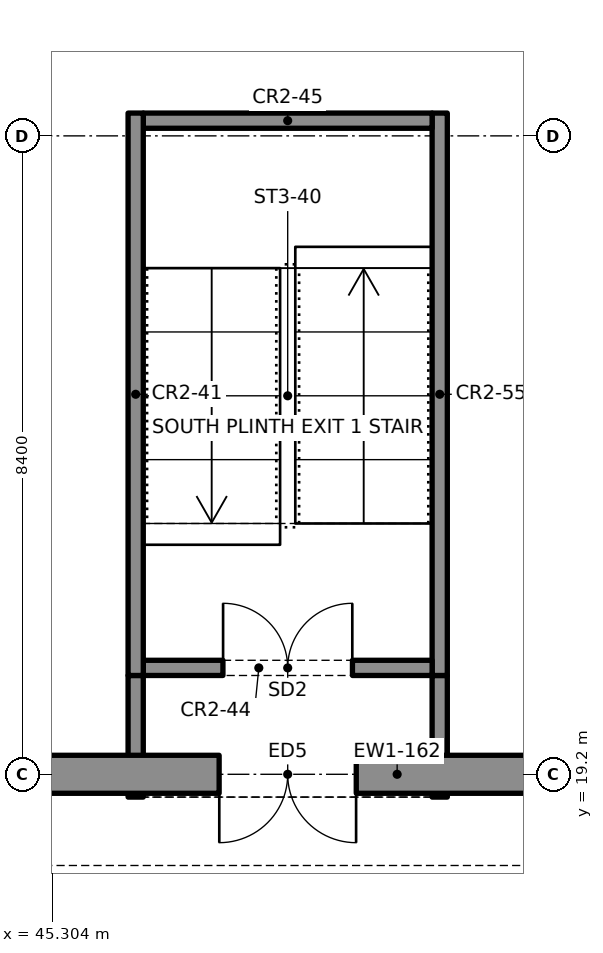
"""IFC4 building model, lengths in metres.
Left out: names, types, materials, properties, quantities, classifications, styles, units other than length and angle.
Written with IfcOpenShell. Run it as: python <this file> out.ifc"""

import sys

from ifc_helpers import new_model, si_unit, direction, frame, frame_2d, origin, place, context, subcontext, project, spatial, rectangle, extrude, element, fill, save


model = new_model("IFC4")
c1 = context("Model", 3, precision=1e-05, world=origin(), true_north=direction((0.0, 1.0)))
c2 = subcontext(c1, "Body", "Model", "MODEL_VIEW")
j1 = project(units=[si_unit("LENGTHUNIT", "METRE"), si_unit("PLANEANGLEUNIT", "RADIAN")], contexts=[c1])
p1 = place(None, origin())
s1 = spatial("IfcSite", under=j1, at=p1, CompositionType="ELEMENT")
p2 = place(p1, origin())
s2 = spatial("IfcBuilding", under=s1, at=p2, CompositionType="ELEMENT")
p3 = place(p2, origin())
s3 = spatial("IfcBuildingStorey", under=s2, at=p3, CompositionType="ELEMENT", Elevation=0.0)
p4 = place(p3, frame((41.2, 19.2, 0.0), z_axis=(0.0, 0.0, 1.0), x_axis=(1.0, 0.0, 0.0)))
e1 = element("IfcWall", 1, at=p4, inside=s3, PredefinedType="SOLIDWALL", context=c2, shape_type="SweptSolid", body=[
    extrude(rectangle(XDim=14.4, YDim=0.5, at=frame_2d((7.2, 0.0))), origin(), (0.0, 0.0, 1.0), 3.65),
])
p5 = place(p4, frame((0.96, 0.0, 0.9)))
e2 = element("IfcOpeningElement", 2, at=p5, cuts=e1, PredefinedType="OPENING", context=c2, shape_type="SweptSolid", body=[
    extrude(rectangle(XDim=2.4, YDim=1.8, at=frame_2d((1.2, 0.9))), frame((0.0, 0.26, 0.0), z_axis=(0.0, -1.0, 0.0), x_axis=(1.0, 0.0, 0.0)), (0.0, 0.0, 1.0), 0.52),
])
p6 = place(p4, frame((11.04, 0.0, 0.9)))
e3 = element("IfcOpeningElement", 3, at=p6, cuts=e1, PredefinedType="OPENING", context=c2, shape_type="SweptSolid", body=[
    extrude(rectangle(XDim=2.4, YDim=1.8, at=frame_2d((1.2, 0.9))), frame((0.0, 0.26, 0.0), z_axis=(0.0, -1.0, 0.0), x_axis=(1.0, 0.0, 0.0)), (0.0, 0.0, 1.0), 0.52),
])
p7 = place(p4, frame((6.3, 0.0, 0.0)))
e4 = element("IfcOpeningElement", 4, at=p7, cuts=e1, PredefinedType="OPENING", context=c2, shape_type="SweptSolid", body=[
    extrude(rectangle(XDim=1.8, YDim=2.4, at=frame_2d((0.9, 1.2))), frame((0.0, 0.26, 0.0), z_axis=(0.0, -1.0, 0.0), x_axis=(1.0, 0.0, 0.0)), (0.0, 0.0, 1.0), 0.52),
])
for number, where, z_axis, x_axis in (
    (5, (46.4, 20.5, 0.0), (0.0, 0.0, 1.0), (0.0, 1.0, 0.0)),
    (6, (50.4, 20.5, 0.0), (0.0, 0.0, 1.0), (0.0, 1.0, 0.0)),
):
    element("IfcWall", number, at=place(p3, frame(where, z_axis=z_axis, x_axis=x_axis)), inside=s3, PredefinedType="SOLIDWALL", context=c2, shape_type="SweptSolid", body=[
        extrude(rectangle(XDim=7.4, YDim=0.2, at=frame_2d((3.7, 0.0))), origin(), (0.0, 0.0, 1.0), 4.4),
    ])
p8 = place(p3, frame((46.5, 20.6, 0.0), z_axis=(0.0, 0.0, 1.0), x_axis=(1.0, 0.0, 0.0)))
e7 = element("IfcWall", 7, at=p8, inside=s3, PredefinedType="SOLIDWALL", context=c2, shape_type="SweptSolid", body=[
    extrude(rectangle(XDim=3.8, YDim=0.2, at=frame_2d((1.9, 0.0))), origin(), (0.0, 0.0, 1.0), 4.4),
])
p9 = place(p8, frame((1.05, 0.0, 0.0)))
e8 = element("IfcOpeningElement", 8, at=p9, cuts=e7, PredefinedType="OPENING", context=c2, shape_type="SweptSolid", body=[
    extrude(rectangle(XDim=1.7, YDim=2.1, at=frame_2d((0.85, 1.05))), frame((0.0, 0.11, 0.0), z_axis=(0.0, -1.0, 0.0), x_axis=(1.0, 0.0, 0.0)), (0.0, 0.0, 1.0), 0.22),
])
p10 = place(p3, frame((46.5, 27.8, 0.0), z_axis=(0.0, 0.0, 1.0), x_axis=(1.0, 0.0, 0.0)))
e9 = element("IfcWall", 9, at=p10, inside=s3, PredefinedType="SOLIDWALL", context=c2, shape_type="SweptSolid", body=[
    extrude(rectangle(XDim=3.8, YDim=0.2, at=frame_2d((1.9, 0.0))), origin(), (0.0, 0.0, 1.0), 4.4),
])
for number, where, z_axis, x_axis in (
    (10, (46.4, 18.9, 0.0), (0.0, 0.0, 1.0), (0.0, 1.0, 0.0)),
    (11, (50.4, 18.9, 0.0), (0.0, 0.0, 1.0), (0.0, 1.0, 0.0)),
):
    element("IfcWall", number, at=place(p3, frame(where, z_axis=z_axis, x_axis=x_axis)), inside=s3, PredefinedType="SOLIDWALL", context=c2, shape_type="SweptSolid", body=[
        extrude(rectangle(XDim=1.6, YDim=0.2, at=frame_2d((0.8, 0.0))), origin(), (0.0, 0.0, 1.0), 4.4),
    ])
p11 = place(p7, origin())
e12 = element("IfcDoor", 12, at=p11, inside=s3, OperationType="DOUBLE_DOOR_SINGLE_SWING", PredefinedType="DOOR", context=c2, shape_type="SweptSolid", body=[
    extrude(rectangle(XDim=1.8, YDim=2.4, at=frame_2d((0.9, 1.2))), frame((0.0, 0.025, 0.0), z_axis=(0.0, -1.0, 0.0), x_axis=(1.0, 0.0, 0.0)), (0.0, 0.0, 1.0), 0.05),
])
fill(e4, e12)
p12 = place(p9, origin())
e13 = element("IfcDoor", 13, at=p12, inside=s3, OperationType="DOUBLE_DOOR_SINGLE_SWING", PredefinedType="DOOR", context=c2, shape_type="SweptSolid", body=[
    extrude(rectangle(XDim=1.7, YDim=2.1, at=frame_2d((0.85, 1.05))), frame((0.0, 0.025, 0.0), z_axis=(0.0, -1.0, 0.0), x_axis=(1.0, 0.0, 0.0)), (0.0, 0.0, 1.0), 0.05),
])
fill(e8, e13)
save(model, sys.argv[1])
